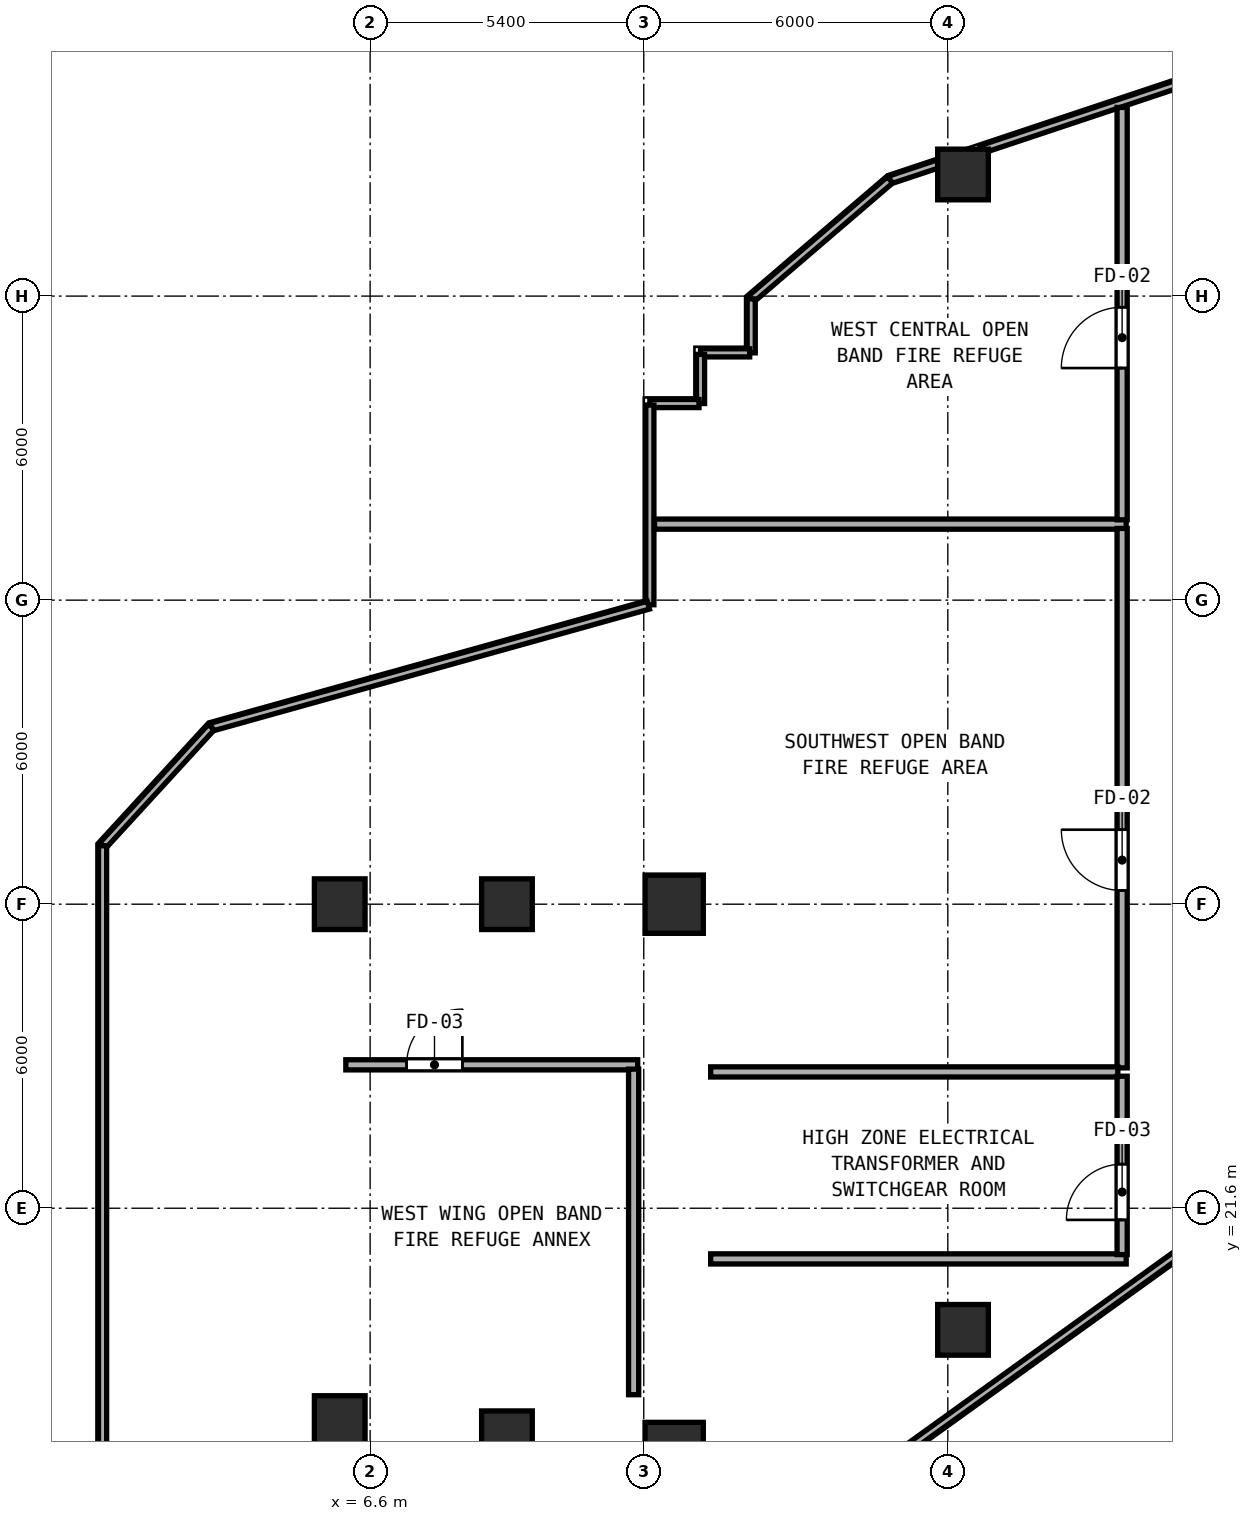
"""IFC4 building model, lengths in metres.
Left out: names, types, materials, properties, quantities, classifications, styles, units other than length and angle.
Written with IfcOpenShell. Run it as: python <this file> out.ifc"""

import sys

from ifc_helpers import new_model, si_unit, direction, frame, frame_2d, origin, origin_2d, place, context, subcontext, project, spatial, rectangle, hollow_rectangle, extrude, element, fill, save


model = new_model("IFC4")
c1 = context("Model", 3, precision=1e-05, world=origin(), true_north=direction((0.0, 1.0)))
c2 = subcontext(c1, "Body", "Model", "MODEL_VIEW")
j1 = project(units=[si_unit("LENGTHUNIT", "METRE"), si_unit("PLANEANGLEUNIT", "RADIAN")], contexts=[c1])
p1 = place(None, origin())
s1 = spatial("IfcSite", under=j1, at=p1, CompositionType="ELEMENT")
p2 = place(p1, origin())
s2 = spatial("IfcBuilding", under=s1, at=p2, CompositionType="ELEMENT")
p3 = place(p2, frame((0.0, 0.0, 89.4)))
s3 = spatial("IfcBuildingStorey", under=s2, at=p3, CompositionType="ELEMENT", Elevation=89.4)
for number, where, z_axis, x_axis in (
    (1, (12.6, 16.8, 0.0), (0.0, 0.0, 1.0), (1.0, 0.0, 0.0)),
    (2, (12.6, 27.6, 0.0), (0.0, 0.0, 1.0), (1.0, 0.0, 0.0)),
):
    element("IfcColumn", number, at=place(p3, frame(where, z_axis=z_axis, x_axis=x_axis)), inside=s3, PredefinedType="COLUMN", context=c2, shape_type="SweptSolid", body=[
        extrude(hollow_rectangle(XDim=1.15, YDim=1.15, WallThickness=0.042, at=origin_2d()), origin(), (0.0, 0.0, 1.0), 4.6),
    ])
for number, where, z_axis, x_axis in (
    (3, (6.0, 17.4, 0.0), (0.0, 0.0, 1.0), (1.0, 0.0, 0.0)),
    (4, (6.0, 27.6, 0.0), (0.0, 0.0, 1.0), (1.0, 0.0, 0.0)),
    (5, (18.3, 19.2, 0.0), (0.0, 0.0, 1.0), (1.0, 0.0, 0.0)),
    (6, (18.3, 42.0, 0.0), (0.0, 0.0, 1.0), (1.0, 0.0, 0.0)),
    (7, (9.3, 17.1, 0.0), (0.0, 0.0, 1.0), (1.0, 0.0, 0.0)),
    (8, (9.3, 27.6, 0.0), (0.0, 0.0, 1.0), (1.0, 0.0, 0.0)),
):
    element("IfcColumn", number, at=place(p3, frame(where, z_axis=z_axis, x_axis=x_axis)), inside=s3, PredefinedType="COLUMN", context=c2, shape_type="SweptSolid", body=[
        extrude(hollow_rectangle(XDim=1.0, YDim=1.0, WallThickness=0.038, at=origin_2d()), origin(), (0.0, 0.0, 1.0), 4.6),
    ])
p4 = place(p3, frame((14.193, 14.687, 0.0), z_axis=(0.0, 0.0, 1.0), x_axis=(0.811542882303, 0.584292863368, 0.0)))
e9 = element("IfcWall", 9, at=p4, inside=s3, PredefinedType="PARAPET", context=c2, shape_type="SweptSolid", body=[
    extrude(rectangle(XDim=11.386, YDim=0.16, at=frame_2d((5.693, 0.0))), origin(), (0.0, 0.0, 1.0), 1.15),
])
p5 = place(p3, frame((24.092, 44.304, 0.0), z_axis=(0.0, 0.0, 1.0), x_axis=(-0.948683298051, -0.316227766017, 0.0)))
e10 = element("IfcWall", 10, at=p5, inside=s3, PredefinedType="PARAPET", context=c2, shape_type="SweptSolid", body=[
    extrude(rectangle(XDim=5.73, YDim=0.16, at=frame_2d((2.865, 0.0))), origin(), (0.0, 0.0, 1.0), 1.15),
])
p6 = place(p3, frame((17.808, 42.209, 0.0), z_axis=(0.0, 0.0, 1.0), x_axis=(-0.948707727558, -0.316154468056, 0.0)))
e11 = element("IfcWall", 11, at=p6, inside=s3, PredefinedType="PARAPET", context=c2, shape_type="SweptSolid", body=[
    extrude(rectangle(XDim=0.999, YDim=0.16, at=frame_2d((0.5, 0.0))), origin(), (0.0, 0.0, 1.0), 1.15),
])
p7 = place(p3, frame((16.86, 41.894, 0.0), z_axis=(0.0, 0.0, 1.0), x_axis=(-0.759247051556, -0.650802515902, 0.0)))
e12 = element("IfcWall", 12, at=p7, inside=s3, PredefinedType="PARAPET", context=c2, shape_type="SweptSolid", body=[
    extrude(rectangle(XDim=3.609, YDim=0.16, at=frame_2d((1.804, 0.0))), origin(), (0.0, 0.0, 1.0), 1.15),
])
p8 = place(p3, frame((14.12, 39.545, 0.0), z_axis=(0.0, 0.0, 1.0), x_axis=(0.0, -1.0, 0.0)))
e13 = element("IfcWall", 13, at=p8, inside=s3, PredefinedType="PARAPET", context=c2, shape_type="SweptSolid", body=[
    extrude(rectangle(XDim=1.065, YDim=0.16, at=frame_2d((0.532, 0.0))), origin(), (0.0, 0.0, 1.0), 1.15),
])
for number, where, z_axis, x_axis in (
    (14, (14.09, 38.48, 0.0), (0.0, 0.0, 1.0), (-1.0, 0.0, 0.0)),
    (15, (13.12, 38.45, 0.0), (0.0, 0.0, 1.0), (0.0, -1.0, 0.0)),
    (16, (13.09, 37.48, 0.0), (0.0, 0.0, 1.0), (-1.0, 0.0, 0.0)),
):
    element("IfcWall", number, at=place(p3, frame(where, z_axis=z_axis, x_axis=x_axis)), inside=s3, PredefinedType="PARAPET", context=c2, shape_type="SweptSolid", body=[
        extrude(rectangle(XDim=0.97, YDim=0.16, at=frame_2d((0.485, 0.0))), origin(), (0.0, 0.0, 1.0), 1.15),
    ])
p9 = place(p3, frame((12.12, 37.45, 0.0), z_axis=(0.0, 0.0, 1.0), x_axis=(0.0, -1.0, 0.0)))
e17 = element("IfcWall", 17, at=p9, inside=s3, PredefinedType="PARAPET", context=c2, shape_type="SweptSolid", body=[
    extrude(rectangle(XDim=3.941, YDim=0.16, at=frame_2d((1.971, 0.0))), origin(), (0.0, 0.0, 1.0), 1.15),
])
p10 = place(p3, frame((12.091, 33.501, 0.0), z_axis=(0.0, 0.0, 1.0), x_axis=(-0.963194988148, -0.26880367335, 0.0)))
e18 = element("IfcWall", 18, at=p10, inside=s3, PredefinedType="PARAPET", context=c2, shape_type="SweptSolid", body=[
    extrude(rectangle(XDim=8.955, YDim=0.16, at=frame_2d((4.478, 0.0))), origin(), (0.0, 0.0, 1.0), 1.15),
])
p11 = place(p3, frame((3.465, 31.094, 0.0), z_axis=(0.0, 0.0, 1.0), x_axis=(-0.675755969938, -0.737125409339, 0.0)))
e19 = element("IfcWall", 19, at=p11, inside=s3, PredefinedType="PARAPET", context=c2, shape_type="SweptSolid", body=[
    extrude(rectangle(XDim=3.175, YDim=0.16, at=frame_2d((1.587, 0.0))), origin(), (0.0, 0.0, 1.0), 1.15),
])
p12 = place(p3, frame((1.32, 28.753, 0.0), z_axis=(0.0, 0.0, 1.0), x_axis=(0.0, -1.0, 0.0)))
e20 = element("IfcWall", 20, at=p12, inside=s3, PredefinedType="PARAPET", context=c2, shape_type="SweptSolid", body=[
    extrude(rectangle(XDim=20.803, YDim=0.16, at=frame_2d((10.402, 0.0))), origin(), (0.0, 0.0, 1.0), 1.15),
])
p13 = place(p3, frame((12.212, 35.1, 0.0), z_axis=(0.0, 0.0, 1.0), x_axis=(1.0, 0.0, 0.0)))
e21 = element("IfcWall", 21, at=p13, inside=s3, PredefinedType="SOLIDWALL", context=c2, shape_type="SweptSolid", body=[
    extrude(rectangle(XDim=9.308, YDim=0.2, at=frame_2d((4.654, 0.0))), origin(), (0.0, 0.0, 1.0), 4.35),
])
p14 = place(p3, frame((21.44, 24.37, 0.0), z_axis=(0.0, 0.0, 1.0), x_axis=(0.0, 1.0, 0.0)))
e22 = element("IfcWall", 22, at=p14, inside=s3, PredefinedType="SOLIDWALL", context=c2, shape_type="SweptSolid", body=[
    extrude(rectangle(XDim=10.645, YDim=0.2, at=frame_2d((5.322, 0.0))), origin(), (0.0, 0.0, 1.0), 4.35),
])
p15 = place(p14, frame((4.7, 0.0, 0.0), z_axis=(0.0, 0.0, 1.0), x_axis=(-1.0, 0.0, 0.0)))
e23 = element("IfcOpeningElement", 23, at=p15, cuts=e22, PredefinedType="OPENING", context=c2, shape_type="SweptSolid", body=[
    extrude(rectangle(XDim=1.2, YDim=2.15, at=frame_2d((0.6, 1.075))), frame((0.0, 0.11, 0.0), z_axis=(0.0, -1.0, 0.0), x_axis=(1.0, 0.0, 0.0)), (0.0, 0.0, 1.0), 0.22),
])
p16 = place(p3, frame((21.44, 35.185, 0.0), z_axis=(0.0, 0.0, 1.0), x_axis=(0.0, 1.0, 0.0)))
e24 = element("IfcWall", 24, at=p16, inside=s3, PredefinedType="SOLIDWALL", context=c2, shape_type="SweptSolid", body=[
    extrude(rectangle(XDim=8.138, YDim=0.2, at=frame_2d((4.069, 0.0))), origin(), (0.0, 0.0, 1.0), 4.35),
])
p17 = place(p16, frame((4.195, 0.0, 0.0), z_axis=(0.0, 0.0, 1.0), x_axis=(-1.0, 0.0, 0.0)))
e25 = element("IfcOpeningElement", 25, at=p17, cuts=e24, PredefinedType="OPENING", context=c2, shape_type="SweptSolid", body=[
    extrude(rectangle(XDim=1.2, YDim=2.15, at=frame_2d((0.6, 1.075))), frame((0.0, 0.11, 0.0), z_axis=(0.0, -1.0, 0.0), x_axis=(1.0, 0.0, 0.0)), (0.0, 0.0, 1.0), 0.22),
])
p18 = place(p3, frame((13.32, 24.29, 0.0), z_axis=(0.0, 0.0, 1.0), x_axis=(1.0, 0.0, 0.0)))
e26 = element("IfcWall", 26, at=p18, inside=s3, PredefinedType="SOLIDWALL", context=c2, shape_type="SweptSolid", body=[
    extrude(rectangle(XDim=8.035, YDim=0.2, at=frame_2d((4.018, 0.0))), origin(), (0.0, 0.0, 1.0), 4.35),
])
p19 = place(p3, frame((13.32, 20.6, 0.0), z_axis=(0.0, 0.0, 1.0), x_axis=(1.0, 0.0, 0.0)))
e27 = element("IfcWall", 27, at=p19, inside=s3, PredefinedType="SOLIDWALL", context=c2, shape_type="SweptSolid", body=[
    extrude(rectangle(XDim=8.2, YDim=0.2, at=frame_2d((4.1, 0.0))), origin(), (0.0, 0.0, 1.0), 4.35),
])
p20 = place(p3, frame((21.44, 20.685, 0.0), z_axis=(0.0, 0.0, 1.0), x_axis=(0.0, 1.0, 0.0)))
e28 = element("IfcWall", 28, at=p20, inside=s3, PredefinedType="SOLIDWALL", context=c2, shape_type="SweptSolid", body=[
    extrude(rectangle(XDim=3.52, YDim=0.2, at=frame_2d((1.76, 0.0))), origin(), (0.0, 0.0, 1.0), 4.35),
])
p21 = place(p20, frame((1.785, 0.0, 0.0), z_axis=(0.0, 0.0, 1.0), x_axis=(-1.0, 0.0, 0.0)))
e29 = element("IfcOpeningElement", 29, at=p21, cuts=e28, PredefinedType="OPENING", context=c2, shape_type="SweptSolid", body=[
    extrude(rectangle(XDim=1.1, YDim=2.15, at=frame_2d((0.55, 1.075))), frame((0.0, 0.11, 0.0), z_axis=(0.0, -1.0, 0.0), x_axis=(1.0, 0.0, 0.0)), (0.0, 0.0, 1.0), 0.22),
])
p22 = place(p3, frame((6.12, 24.43, 0.0), z_axis=(0.0, 0.0, 1.0), x_axis=(1.0, 0.0, 0.0)))
e30 = element("IfcWall", 30, at=p22, inside=s3, PredefinedType="SOLIDWALL", context=c2, shape_type="SweptSolid", body=[
    extrude(rectangle(XDim=5.76, YDim=0.2, at=frame_2d((2.88, 0.0))), origin(), (0.0, 0.0, 1.0), 4.35),
])
p23 = place(p22, frame((2.3, 0.0, 0.0), z_axis=(0.0, 0.0, 1.0), x_axis=(-1.0, 0.0, 0.0)))
e31 = element("IfcOpeningElement", 31, at=p23, cuts=e30, PredefinedType="OPENING", context=c2, shape_type="SweptSolid", body=[
    extrude(rectangle(XDim=1.1, YDim=2.15, at=frame_2d((0.55, 1.075))), frame((0.0, 0.11, 0.0), z_axis=(0.0, -1.0, 0.0), x_axis=(1.0, 0.0, 0.0)), (0.0, 0.0, 1.0), 0.22),
])
p24 = place(p3, frame((11.8, 17.92, 0.0), z_axis=(0.0, 0.0, 1.0), x_axis=(0.0, 1.0, 0.0)))
e32 = element("IfcWall", 32, at=p24, inside=s3, PredefinedType="SOLIDWALL", context=c2, shape_type="SweptSolid", body=[
    extrude(rectangle(XDim=6.425, YDim=0.2, at=frame_2d((3.212, 0.0))), origin(), (0.0, 0.0, 1.0), 4.35),
])
p25 = place(p15, origin())
e33 = element("IfcDoor", 33, at=p25, inside=s3, OperationType="SINGLE_SWING_LEFT", PredefinedType="DOOR", context=c2, shape_type="SweptSolid", body=[
    extrude(rectangle(XDim=1.2, YDim=2.15, at=frame_2d((0.6, 1.075))), frame((0.0, 0.025, 0.0), z_axis=(0.0, -1.0, 0.0), x_axis=(1.0, 0.0, 0.0)), (0.0, 0.0, 1.0), 0.05),
])
fill(e23, e33)
p26 = place(p17, origin())
e34 = element("IfcDoor", 34, at=p26, inside=s3, OperationType="SINGLE_SWING_RIGHT", PredefinedType="DOOR", context=c2, shape_type="SweptSolid", body=[
    extrude(rectangle(XDim=1.2, YDim=2.15, at=frame_2d((0.6, 1.075))), frame((0.0, 0.025, 0.0), z_axis=(0.0, -1.0, 0.0), x_axis=(1.0, 0.0, 0.0)), (0.0, 0.0, 1.0), 0.05),
])
fill(e25, e34)
p27 = place(p21, origin())
e35 = element("IfcDoor", 35, at=p27, inside=s3, OperationType="SINGLE_SWING_RIGHT", PredefinedType="DOOR", context=c2, shape_type="SweptSolid", body=[
    extrude(rectangle(XDim=1.1, YDim=2.15, at=frame_2d((0.55, 1.075))), frame((0.0, 0.025, 0.0), z_axis=(0.0, -1.0, 0.0), x_axis=(1.0, 0.0, 0.0)), (0.0, 0.0, 1.0), 0.05),
])
fill(e29, e35)
p28 = place(p23, origin())
e36 = element("IfcDoor", 36, at=p28, inside=s3, OperationType="SINGLE_SWING_LEFT", PredefinedType="DOOR", context=c2, shape_type="SweptSolid", body=[
    extrude(rectangle(XDim=1.1, YDim=2.15, at=frame_2d((0.55, 1.075))), frame((0.0, 0.025, 0.0), z_axis=(0.0, -1.0, 0.0), x_axis=(1.0, 0.0, 0.0)), (0.0, 0.0, 1.0), 0.05),
])
fill(e31, e36)
save(model, sys.argv[1])
